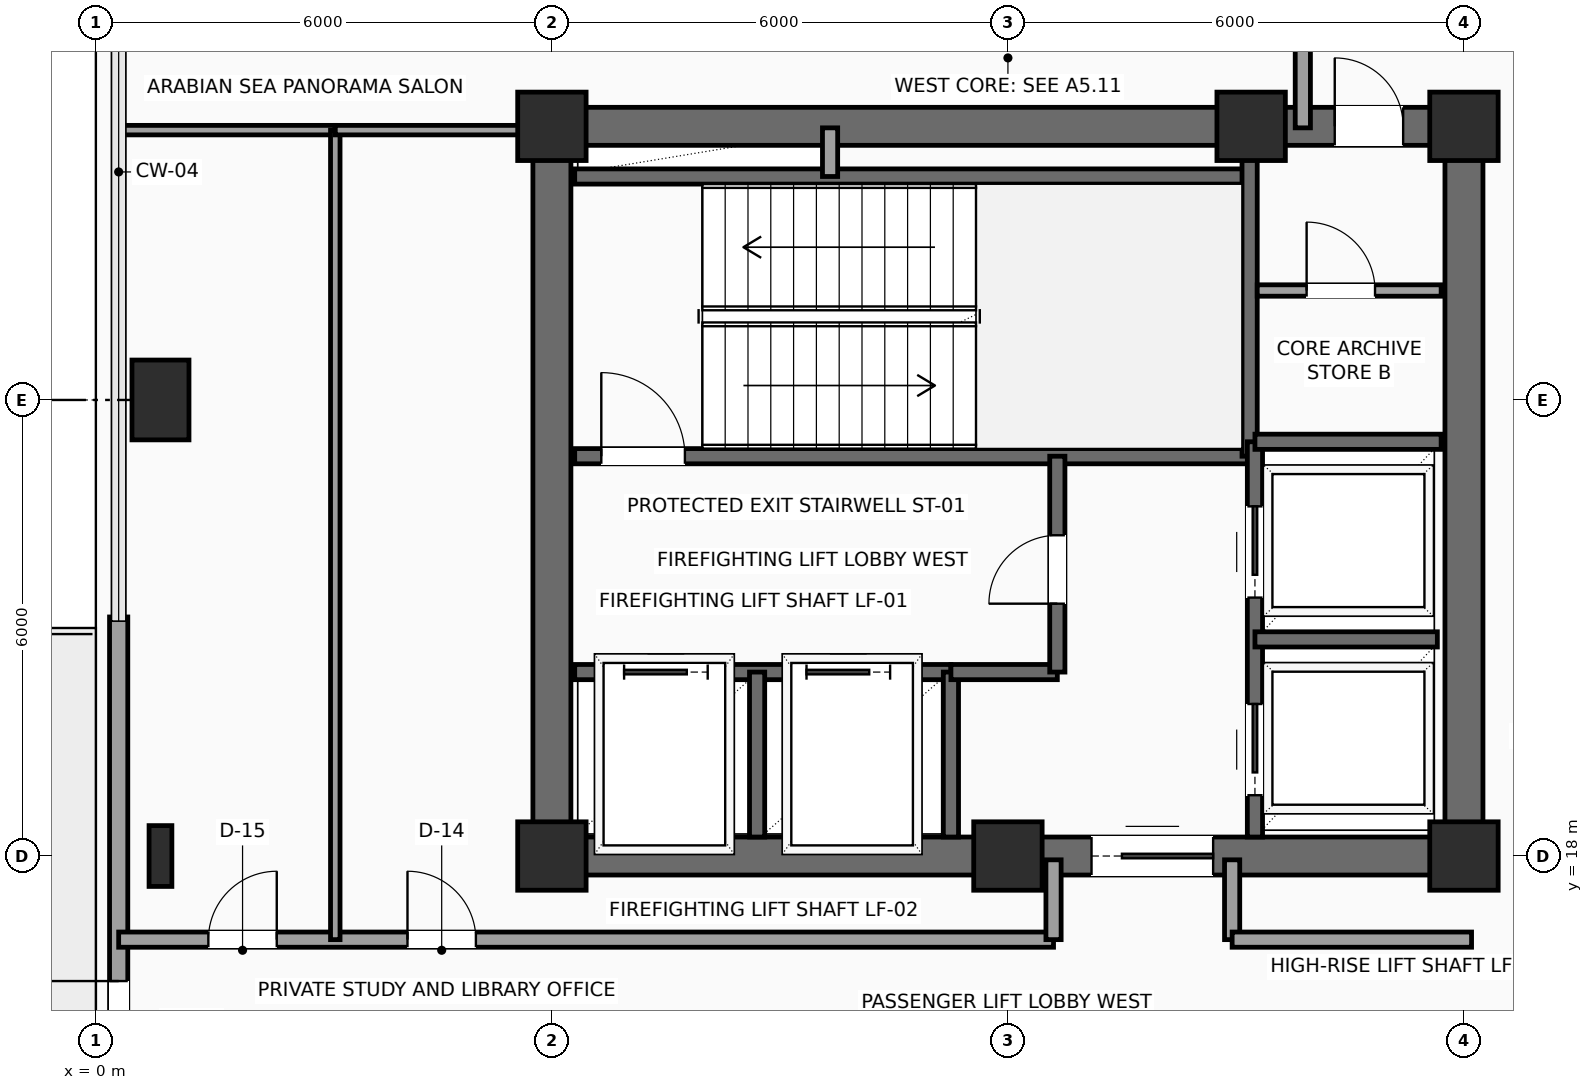
"""IFC4 building model, lengths in metres.
Left out: names, types, materials, properties, quantities, classifications, styles, units other than length and angle.
Written with IfcOpenShell. Run it as: python <this file> out.ifc"""

import sys

from ifc_helpers import new_model, si_unit, direction, frame, frame_2d, origin, origin_2d, place, context, subcontext, project, spatial, rectangle, i_section, extrude, element, fill, save


model = new_model("IFC4")
c1 = context("Model", 3, precision=1e-05, world=origin(), true_north=direction((0.0, 1.0)))
c2 = subcontext(c1, "Body", "Model", "MODEL_VIEW")
j1 = project(units=[si_unit("LENGTHUNIT", "METRE"), si_unit("PLANEANGLEUNIT", "RADIAN")], contexts=[c1])
p1 = place(None, origin())
s1 = spatial("IfcSite", under=j1, at=p1, CompositionType="ELEMENT")
p2 = place(p1, origin())
s2 = spatial("IfcBuilding", under=s1, at=p2, CompositionType="ELEMENT")
p3 = place(p2, frame((0.0, 0.0, 208.65)))
s3 = spatial("IfcBuildingStorey", under=s2, at=p3, CompositionType="ELEMENT", Elevation=208.65)
for number, where, z_axis, x_axis in (
    (1, (6.0, 18.0, 0.0), (0.0, 0.0, 1.0), (1.0, 0.0, 0.0)),
    (2, (12.0, 18.0, 0.0), (0.0, 0.0, 1.0), (1.0, 0.0, 0.0)),
    (3, (18.0, 18.0, 0.0), (0.0, 0.0, 1.0), (1.0, 0.0, 0.0)),
    (4, (6.0, 27.6, 0.0), (0.0, 0.0, 1.0), (1.0, 0.0, 0.0)),
    (5, (15.2, 27.6, 0.0), (0.0, 0.0, 1.0), (1.0, 0.0, 0.0)),
    (6, (18.0, 27.6, 0.0), (0.0, 0.0, 1.0), (1.0, 0.0, 0.0)),
):
    element("IfcColumn", number, at=place(p3, frame(where, z_axis=z_axis, x_axis=x_axis)), inside=s3, PredefinedType="COLUMN", context=c2, shape_type="SweptSolid", body=[
        extrude(rectangle(XDim=0.9, YDim=0.9, at=origin_2d()), origin(), (0.0, 0.0, 1.0), 3.75),
    ])
p4 = place(p3, frame((0.85, 18.0, 0.0), z_axis=(0.0, 0.0, 1.0), x_axis=(1.0, 0.0, 0.0)))
e7 = element("IfcColumn", 7, at=p4, inside=s3, PredefinedType="COLUMN", context=c2, shape_type="SweptSolid", body=[
    extrude(i_section(OverallWidth=0.3, OverallDepth=0.8, WebThickness=0.018, FlangeThickness=0.033, FilletRadius=0.03, at=origin_2d()), origin(), (0.0, 0.0, 1.0), 3.75),
])
p5 = place(p3, frame((0.85, 24.0, 0.0), z_axis=(0.0, 0.0, 1.0), x_axis=(1.0, 0.0, 0.0)))
e8 = element("IfcColumn", 8, at=p5, inside=s3, PredefinedType="COLUMN", context=c2, shape_type="SweptSolid", body=[
    extrude(rectangle(XDim=0.75, YDim=1.05, at=origin_2d()), origin(), (0.0, 0.0, 1.0), 3.75),
])
p6 = place(p3, frame((0.3, 11.855, 0.0), z_axis=(0.0, 0.0, 1.0), x_axis=(0.0, 1.0, 0.0)))
e9 = element("IfcWall", 9, at=p6, inside=s3, PredefinedType="SOLIDWALL", context=c2, shape_type="SweptSolid", body=[
    extrude(rectangle(XDim=9.29, YDim=0.24, at=frame_2d((4.645, 0.0))), origin(), (0.0, 0.0, 1.0), 3.54),
])
p7 = place(p6, frame((3.45, 0.0, 0.0)))
e10 = element("IfcOpeningElement", 10, at=p7, cuts=e9, PredefinedType="OPENING", context=c2, shape_type="SweptSolid", body=[
    extrude(rectangle(XDim=1.05, YDim=2.2, at=frame_2d((0.525, 1.1))), frame((0.0, 0.13, 0.0), z_axis=(0.0, -1.0, 0.0), x_axis=(1.0, 0.0, 0.0)), (0.0, 0.0, 1.0), 0.26),
])
p8 = place(p3, frame((6.0, 18.0, 0.0), z_axis=(0.0, 0.0, 1.0), x_axis=(1.0, 0.0, 0.0)))
e11 = element("IfcWall", 11, at=p8, inside=s3, PredefinedType="SHEAR", context=c2, shape_type="SweptSolid", body=[
    extrude(rectangle(XDim=12.0, YDim=0.5, at=frame_2d((6.0, 0.0))), origin(), (0.0, 0.0, 1.0), 3.54),
])
p9 = place(p8, frame((7.1, 0.0, 0.0)))
e12 = element("IfcOpeningElement", 12, at=p9, cuts=e11, PredefinedType="OPENING", context=c2, shape_type="SweptSolid", body=[
    extrude(rectangle(XDim=1.6, YDim=2.3, at=frame_2d((0.8, 1.15))), frame((0.0, 0.26, 0.0), z_axis=(0.0, -1.0, 0.0), x_axis=(1.0, 0.0, 0.0)), (0.0, 0.0, 1.0), 0.52),
])
p10 = place(p3, frame((6.0, 27.6, 0.0), z_axis=(0.0, 0.0, 1.0), x_axis=(1.0, 0.0, 0.0)))
e13 = element("IfcWall", 13, at=p10, inside=s3, PredefinedType="SHEAR", context=c2, shape_type="SweptSolid", body=[
    extrude(rectangle(XDim=12.0, YDim=0.5, at=frame_2d((6.0, 0.0))), origin(), (0.0, 0.0, 1.0), 3.54),
])
p11 = place(p10, frame((10.3, 0.0, 0.0)))
e14 = element("IfcOpeningElement", 14, at=p11, cuts=e13, PredefinedType="OPENING", context=c2, shape_type="SweptSolid", body=[
    extrude(rectangle(XDim=0.9, YDim=2.15, at=frame_2d((0.45, 1.075))), frame((0.0, 0.26, 0.0), z_axis=(0.0, -1.0, 0.0), x_axis=(1.0, 0.0, 0.0)), (0.0, 0.0, 1.0), 0.52),
])
for number, where, z_axis, x_axis in (
    (15, (6.0, 18.0, 0.0), (0.0, 0.0, 1.0), (0.0, 1.0, 0.0)),
    (16, (18.0, 18.0, 0.0), (0.0, 0.0, 1.0), (0.0, 1.0, 0.0)),
):
    element("IfcWall", number, at=place(p3, frame(where, z_axis=z_axis, x_axis=x_axis)), inside=s3, PredefinedType="SHEAR", context=c2, shape_type="SweptSolid", body=[
        extrude(rectangle(XDim=9.6, YDim=0.5, at=frame_2d((4.8, 0.0))), origin(), (0.0, 0.0, 1.0), 3.54),
    ])
p12 = place(p3, frame((6.3, 23.26, 0.0), z_axis=(0.0, 0.0, 1.0), x_axis=(1.0, 0.0, 0.0)))
e17 = element("IfcWall", 17, at=p12, inside=s3, PredefinedType="SHEAR", context=c2, shape_type="SweptSolid", body=[
    extrude(rectangle(XDim=8.88, YDim=0.2, at=frame_2d((4.44, 0.0))), origin(), (0.0, 0.0, 1.0), 3.54),
])
p13 = place(p12, frame((0.35, 0.0, 0.0)))
e18 = element("IfcOpeningElement", 18, at=p13, cuts=e17, PredefinedType="OPENING", context=c2, shape_type="SweptSolid", body=[
    extrude(rectangle(XDim=1.1, YDim=2.2, at=frame_2d((0.55, 1.1))), frame((0.0, 0.11, 0.0), z_axis=(0.0, -1.0, 0.0), x_axis=(1.0, 0.0, 0.0)), (0.0, 0.0, 1.0), 0.22),
])
p14 = place(p3, frame((6.3, 26.94, 0.0), z_axis=(0.0, 0.0, 1.0), x_axis=(1.0, 0.0, 0.0)))
e19 = element("IfcWall", 19, at=p14, inside=s3, PredefinedType="SHEAR", context=c2, shape_type="SweptSolid", body=[
    extrude(rectangle(XDim=8.88, YDim=0.2, at=frame_2d((4.44, 0.0))), origin(), (0.0, 0.0, 1.0), 3.54),
])
p15 = place(p3, frame((15.18, 23.26, 0.0), z_axis=(0.0, 0.0, 1.0), x_axis=(0.0, 1.0, 0.0)))
e20 = element("IfcWall", 20, at=p15, inside=s3, PredefinedType="SHEAR", context=c2, shape_type="SweptSolid", body=[
    extrude(rectangle(XDim=4.04, YDim=0.2, at=frame_2d((2.02, 0.0))), origin(), (0.0, 0.0, 1.0), 3.54),
])
p16 = place(p3, frame((6.3, 20.42, 0.0), z_axis=(0.0, 0.0, 1.0), x_axis=(1.0, 0.0, 0.0)))
e21 = element("IfcWall", 21, at=p16, inside=s3, PredefinedType="SHEAR", context=c2, shape_type="SweptSolid", body=[
    extrude(rectangle(XDim=4.95, YDim=0.2, at=frame_2d((2.475, 0.0))), origin(), (0.0, 0.0, 1.0), 3.54),
])
p17 = place(p16, frame((0.65, 0.0, 0.0)))
e22 = element("IfcOpeningElement", 22, at=p17, cuts=e21, PredefinedType="OPENING", context=c2, shape_type="SweptSolid", body=[
    extrude(rectangle(XDim=1.1, YDim=2.2, at=frame_2d((0.55, 1.1))), frame((0.0, 0.11, 0.0), z_axis=(0.0, -1.0, 0.0), x_axis=(1.0, 0.0, 0.0)), (0.0, 0.0, 1.0), 0.22),
])
p18 = place(p16, frame((3.05, 0.0, 0.0)))
e23 = element("IfcOpeningElement", 23, at=p18, cuts=e21, PredefinedType="OPENING", context=c2, shape_type="SweptSolid", body=[
    extrude(rectangle(XDim=1.1, YDim=2.2, at=frame_2d((0.55, 1.1))), frame((0.0, 0.11, 0.0), z_axis=(0.0, -1.0, 0.0), x_axis=(1.0, 0.0, 0.0)), (0.0, 0.0, 1.0), 0.22),
])
for number, where, z_axis, x_axis in (
    (24, (8.7, 18.25, 0.0), (0.0, 0.0, 1.0), (0.0, 1.0, 0.0)),
    (25, (11.25, 18.25, 0.0), (0.0, 0.0, 1.0), (0.0, 1.0, 0.0)),
):
    element("IfcWall", number, at=place(p3, frame(where, z_axis=z_axis, x_axis=x_axis)), inside=s3, PredefinedType="SHEAR", context=c2, shape_type="SweptSolid", body=[
        extrude(rectangle(XDim=2.17, YDim=0.2, at=frame_2d((1.085, 0.0))), origin(), (0.0, 0.0, 1.0), 3.54),
    ])
p19 = place(p3, frame((11.25, 20.42, 0.0), z_axis=(0.0, 0.0, 1.0), x_axis=(1.0, 0.0, 0.0)))
e26 = element("IfcWall", 26, at=p19, inside=s3, PredefinedType="SHEAR", context=c2, shape_type="SweptSolid", body=[
    extrude(rectangle(XDim=1.4, YDim=0.2, at=frame_2d((0.7, 0.0))), origin(), (0.0, 0.0, 1.0), 3.54),
])
p20 = place(p3, frame((12.65, 20.42, 0.0), z_axis=(0.0, 0.0, 1.0), x_axis=(0.0, 1.0, 0.0)))
e27 = element("IfcWall", 27, at=p20, inside=s3, PredefinedType="SHEAR", context=c2, shape_type="SweptSolid", body=[
    extrude(rectangle(XDim=2.84, YDim=0.2, at=frame_2d((1.42, 0.0))), origin(), (0.0, 0.0, 1.0), 3.54),
])
p21 = place(p20, frame((0.9, 0.0, 0.0)))
e28 = element("IfcOpeningElement", 28, at=p21, cuts=e27, PredefinedType="OPENING", context=c2, shape_type="SweptSolid", body=[
    extrude(rectangle(XDim=0.9, YDim=2.15, at=frame_2d((0.45, 1.075))), frame((0.0, 0.11, 0.0), z_axis=(0.0, -1.0, 0.0), x_axis=(1.0, 0.0, 0.0)), (0.0, 0.0, 1.0), 0.22),
])
p22 = place(p3, frame((9.66, 26.94, 0.0), z_axis=(0.0, 0.0, 1.0), x_axis=(0.0, 1.0, 0.0)))
e29 = element("IfcWall", 29, at=p22, inside=s3, PredefinedType="SOLIDWALL", context=c2, shape_type="SweptSolid", body=[
    extrude(rectangle(XDim=0.64, YDim=0.2, at=frame_2d((0.32, 0.0))), origin(), (0.0, 0.0, 1.0), 3.54),
])
p23 = place(p3, frame((15.25, 18.25, 0.0), z_axis=(0.0, 0.0, 1.0), x_axis=(0.0, 1.0, 0.0)))
e30 = element("IfcWall", 30, at=p23, inside=s3, PredefinedType="SHEAR", context=c2, shape_type="SweptSolid", body=[
    extrude(rectangle(XDim=5.2, YDim=0.2, at=frame_2d((2.6, 0.0))), origin(), (0.0, 0.0, 1.0), 3.54),
])
p24 = place(p23, frame((0.55, 0.0, 0.0)))
e31 = element("IfcOpeningElement", 31, at=p24, cuts=e30, PredefinedType="OPENING", context=c2, shape_type="SweptSolid", body=[
    extrude(rectangle(XDim=1.2, YDim=2.2, at=frame_2d((0.6, 1.1))), frame((0.0, 0.11, 0.0), z_axis=(0.0, -1.0, 0.0), x_axis=(1.0, 0.0, 0.0)), (0.0, 0.0, 1.0), 0.22),
])
p25 = place(p23, frame((3.15, 0.0, 0.0)))
e32 = element("IfcOpeningElement", 32, at=p25, cuts=e30, PredefinedType="OPENING", context=c2, shape_type="SweptSolid", body=[
    extrude(rectangle(XDim=1.2, YDim=2.2, at=frame_2d((0.6, 1.1))), frame((0.0, 0.11, 0.0), z_axis=(0.0, -1.0, 0.0), x_axis=(1.0, 0.0, 0.0)), (0.0, 0.0, 1.0), 0.22),
])
p26 = place(p3, frame((15.25, 20.85, 0.0), z_axis=(0.0, 0.0, 1.0), x_axis=(1.0, 0.0, 0.0)))
e33 = element("IfcWall", 33, at=p26, inside=s3, PredefinedType="SHEAR", context=c2, shape_type="SweptSolid", body=[
    extrude(rectangle(XDim=2.4, YDim=0.2, at=frame_2d((1.2, 0.0))), origin(), (0.0, 0.0, 1.0), 3.54),
])
p27 = place(p3, frame((15.25, 23.45, 0.0), z_axis=(0.0, 0.0, 1.0), x_axis=(1.0, 0.0, 0.0)))
e34 = element("IfcWall", 34, at=p27, inside=s3, PredefinedType="SHEAR", context=c2, shape_type="SweptSolid", body=[
    extrude(rectangle(XDim=2.45, YDim=0.2, at=frame_2d((1.225, 0.0))), origin(), (0.0, 0.0, 1.0), 3.54),
])
p28 = place(p3, frame((15.28, 25.44, 0.0), z_axis=(0.0, 0.0, 1.0), x_axis=(1.0, 0.0, 0.0)))
e35 = element("IfcWall", 35, at=p28, inside=s3, PredefinedType="PARTITIONING", context=c2, shape_type="SweptSolid", body=[
    extrude(rectangle(XDim=2.42, YDim=0.15, at=frame_2d((1.21, 0.0))), origin(), (0.0, 0.0, 1.0), 3.54),
])
p29 = place(p28, frame((0.65, 0.0, 0.0)))
e36 = element("IfcOpeningElement", 36, at=p29, cuts=e35, PredefinedType="OPENING", context=c2, shape_type="SweptSolid", body=[
    extrude(rectangle(XDim=0.9, YDim=2.15, at=frame_2d((0.45, 1.075))), frame((0.0, 0.085, 0.0), z_axis=(0.0, -1.0, 0.0), x_axis=(1.0, 0.0, 0.0)), (0.0, 0.0, 1.0), 0.17),
])
p30 = place(p3, frame((0.3, 16.9, 0.0), z_axis=(0.0, 0.0, 1.0), x_axis=(1.0, 0.0, 0.0)))
e37 = element("IfcWall", 37, at=p30, inside=s3, PredefinedType="PARTITIONING", context=c2, shape_type="SweptSolid", body=[
    extrude(rectangle(XDim=12.3, YDim=0.2, at=frame_2d((6.15, 0.0))), origin(), (0.0, 0.0, 1.0), 3.54),
])
p31 = place(p30, frame((1.18, 0.0, 0.0)))
e38 = element("IfcOpeningElement", 38, at=p31, cuts=e37, PredefinedType="OPENING", context=c2, shape_type="SweptSolid", body=[
    extrude(rectangle(XDim=0.9, YDim=2.1, at=frame_2d((0.45, 1.05))), frame((0.0, 0.11, 0.0), z_axis=(0.0, -1.0, 0.0), x_axis=(1.0, 0.0, 0.0)), (0.0, 0.0, 1.0), 0.22),
])
p32 = place(p30, frame((3.8, 0.0, 0.0)))
e39 = element("IfcOpeningElement", 39, at=p32, cuts=e37, PredefinedType="OPENING", context=c2, shape_type="SweptSolid", body=[
    extrude(rectangle(XDim=0.9, YDim=2.1, at=frame_2d((0.45, 1.05))), frame((0.0, 0.11, 0.0), z_axis=(0.0, -1.0, 0.0), x_axis=(1.0, 0.0, 0.0)), (0.0, 0.0, 1.0), 0.22),
])
for number, where, z_axis, x_axis in (
    (40, (12.6, 16.9, 0.0), (0.0, 0.0, 1.0), (0.0, 1.0, 0.0)),
    (41, (14.95, 17.95, 0.0), (0.0, 0.0, 1.0), (0.0, -1.0, 0.0)),
):
    element("IfcWall", number, at=place(p3, frame(where, z_axis=z_axis, x_axis=x_axis)), inside=s3, PredefinedType="PARTITIONING", context=c2, shape_type="SweptSolid", body=[
        extrude(rectangle(XDim=1.05, YDim=0.2, at=frame_2d((0.525, 0.0))), origin(), (0.0, 0.0, 1.0), 3.54),
    ])
p33 = place(p3, frame((14.95, 16.9, 0.0), z_axis=(0.0, 0.0, 1.0), x_axis=(1.0, 0.0, 0.0)))
e42 = element("IfcWall", 42, at=p33, inside=s3, PredefinedType="PARTITIONING", context=c2, shape_type="SweptSolid", body=[
    extrude(rectangle(XDim=3.15, YDim=0.2, at=frame_2d((1.575, 0.0))), origin(), (0.0, 0.0, 1.0), 3.54),
])
p34 = place(p3, frame((15.88, 27.58, 0.0), z_axis=(0.0, 0.0, 1.0), x_axis=(0.0, 1.0, 0.0)))
e43 = element("IfcWall", 43, at=p34, inside=s3, PredefinedType="PARTITIONING", context=c2, shape_type="SweptSolid", body=[
    extrude(rectangle(XDim=2.67, YDim=0.2, at=frame_2d((1.335, 0.0))), origin(), (0.0, 0.0, 1.0), 3.54),
])
p35 = place(p3, frame((0.3, 27.55, 0.0), z_axis=(0.0, 0.0, 1.0), x_axis=(1.0, 0.0, 0.0)))
e44 = element("IfcWall", 44, at=p35, inside=s3, PredefinedType="PARTITIONING", context=c2, shape_type="SweptSolid", body=[
    extrude(rectangle(XDim=2.85, YDim=0.125, at=frame_2d((1.425, 0.0))), origin(), (0.0, 0.0, 1.0), 3.54),
])
p36 = place(p3, frame((3.15, 16.9, 0.0), z_axis=(0.0, 0.0, 1.0), x_axis=(0.0, 1.0, 0.0)))
e45 = element("IfcWall", 45, at=p36, inside=s3, PredefinedType="PARTITIONING", context=c2, shape_type="SweptSolid", body=[
    extrude(rectangle(XDim=10.65, YDim=0.125, at=frame_2d((5.325, 0.0))), origin(), (0.0, 0.0, 1.0), 3.54),
])
p37 = place(p3, frame((3.15, 27.55, 0.0), z_axis=(0.0, 0.0, 1.0), x_axis=(1.0, 0.0, 0.0)))
e46 = element("IfcWall", 46, at=p37, inside=s3, PredefinedType="PARTITIONING", context=c2, shape_type="SweptSolid", body=[
    extrude(rectangle(XDim=2.8, YDim=0.125, at=frame_2d((1.4, 0.0))), origin(), (0.0, 0.0, 1.0), 3.54),
])
p38 = place(p7, origin())
e47 = element("IfcDoor", 47, at=p38, inside=s3, OperationType="SINGLE_SWING_RIGHT", PredefinedType="DOOR", context=c2, shape_type="SweptSolid", body=[
    extrude(rectangle(XDim=1.05, YDim=2.2, at=frame_2d((0.525, 1.1))), frame((0.0, 0.025, 0.0), z_axis=(0.0, -1.0, 0.0), x_axis=(1.0, 0.0, 0.0)), (0.0, 0.0, 1.0), 0.05),
])
fill(e10, e47)
p39 = place(p9, origin())
e48 = element("IfcDoor", 48, at=p39, inside=s3, OperationType="DOUBLE_DOOR_SLIDING", PredefinedType="DOOR", context=c2, shape_type="SweptSolid", body=[
    extrude(rectangle(XDim=1.6, YDim=2.3, at=frame_2d((0.8, 1.15))), frame((0.0, 0.025, 0.0), z_axis=(0.0, -1.0, 0.0), x_axis=(1.0, 0.0, 0.0)), (0.0, 0.0, 1.0), 0.05),
])
fill(e12, e48)
p40 = place(p11, origin())
e49 = element("IfcDoor", 49, at=p40, inside=s3, OperationType="SINGLE_SWING_LEFT", PredefinedType="DOOR", context=c2, shape_type="SweptSolid", body=[
    extrude(rectangle(XDim=0.9, YDim=2.15, at=frame_2d((0.45, 1.075))), frame((0.0, 0.025, 0.0), z_axis=(0.0, -1.0, 0.0), x_axis=(1.0, 0.0, 0.0)), (0.0, 0.0, 1.0), 0.05),
])
fill(e14, e49)
p41 = place(p13, origin())
e50 = element("IfcDoor", 50, at=p41, inside=s3, OperationType="SINGLE_SWING_LEFT", PredefinedType="DOOR", context=c2, shape_type="SweptSolid", body=[
    extrude(rectangle(XDim=1.1, YDim=2.2, at=frame_2d((0.55, 1.1))), frame((0.0, 0.025, 0.0), z_axis=(0.0, -1.0, 0.0), x_axis=(1.0, 0.0, 0.0)), (0.0, 0.0, 1.0), 0.05),
])
fill(e18, e50)
p42 = place(p17, origin())
e51 = element("IfcDoor", 51, at=p42, inside=s3, OperationType="SLIDING_TO_LEFT", PredefinedType="DOOR", context=c2, shape_type="SweptSolid", body=[
    extrude(rectangle(XDim=1.1, YDim=2.2, at=frame_2d((0.55, 1.1))), frame((0.0, 0.025, 0.0), z_axis=(0.0, -1.0, 0.0), x_axis=(1.0, 0.0, 0.0)), (0.0, 0.0, 1.0), 0.05),
])
fill(e22, e51)
p43 = place(p18, origin())
e52 = element("IfcDoor", 52, at=p43, inside=s3, OperationType="SLIDING_TO_LEFT", PredefinedType="DOOR", context=c2, shape_type="SweptSolid", body=[
    extrude(rectangle(XDim=1.1, YDim=2.2, at=frame_2d((0.55, 1.1))), frame((0.0, 0.025, 0.0), z_axis=(0.0, -1.0, 0.0), x_axis=(1.0, 0.0, 0.0)), (0.0, 0.0, 1.0), 0.05),
])
fill(e23, e52)
p44 = place(p21, origin())
e53 = element("IfcDoor", 53, at=p44, inside=s3, OperationType="SINGLE_SWING_LEFT", PredefinedType="DOOR", context=c2, shape_type="SweptSolid", body=[
    extrude(rectangle(XDim=0.9, YDim=2.15, at=frame_2d((0.45, 1.075))), frame((0.0, 0.025, 0.0), z_axis=(0.0, -1.0, 0.0), x_axis=(1.0, 0.0, 0.0)), (0.0, 0.0, 1.0), 0.05),
])
fill(e28, e53)
p45 = place(p24, origin())
e54 = element("IfcDoor", 54, at=p45, inside=s3, OperationType="SLIDING_TO_RIGHT", PredefinedType="DOOR", context=c2, shape_type="SweptSolid", body=[
    extrude(rectangle(XDim=1.2, YDim=2.2, at=frame_2d((0.6, 1.1))), frame((0.0, 0.025, 0.0), z_axis=(0.0, -1.0, 0.0), x_axis=(1.0, 0.0, 0.0)), (0.0, 0.0, 1.0), 0.05),
])
fill(e31, e54)
p46 = place(p25, origin())
e55 = element("IfcDoor", 55, at=p46, inside=s3, OperationType="SLIDING_TO_RIGHT", PredefinedType="DOOR", context=c2, shape_type="SweptSolid", body=[
    extrude(rectangle(XDim=1.2, YDim=2.2, at=frame_2d((0.6, 1.1))), frame((0.0, 0.025, 0.0), z_axis=(0.0, -1.0, 0.0), x_axis=(1.0, 0.0, 0.0)), (0.0, 0.0, 1.0), 0.05),
])
fill(e32, e55)
p47 = place(p29, origin())
e56 = element("IfcDoor", 56, at=p47, inside=s3, OperationType="SINGLE_SWING_LEFT", PredefinedType="DOOR", context=c2, shape_type="SweptSolid", body=[
    extrude(rectangle(XDim=0.9, YDim=2.15, at=frame_2d((0.45, 1.075))), frame((0.0, 0.025, 0.0), z_axis=(0.0, -1.0, 0.0), x_axis=(1.0, 0.0, 0.0)), (0.0, 0.0, 1.0), 0.05),
])
fill(e36, e56)
p48 = place(p31, origin())
e57 = element("IfcDoor", 57, at=p48, inside=s3, OperationType="SINGLE_SWING_RIGHT", PredefinedType="DOOR", context=c2, shape_type="SweptSolid", body=[
    extrude(rectangle(XDim=0.9, YDim=2.1, at=frame_2d((0.45, 1.05))), frame((0.0, 0.025, 0.0), z_axis=(0.0, -1.0, 0.0), x_axis=(1.0, 0.0, 0.0)), (0.0, 0.0, 1.0), 0.05),
])
fill(e38, e57)
p49 = place(p32, origin())
e58 = element("IfcDoor", 58, at=p49, inside=s3, OperationType="SINGLE_SWING_LEFT", PredefinedType="DOOR", context=c2, shape_type="SweptSolid", body=[
    extrude(rectangle(XDim=0.9, YDim=2.1, at=frame_2d((0.45, 1.05))), frame((0.0, 0.025, 0.0), z_axis=(0.0, -1.0, 0.0), x_axis=(1.0, 0.0, 0.0)), (0.0, 0.0, 1.0), 0.05),
])
fill(e39, e58)
save(model, sys.argv[1])
